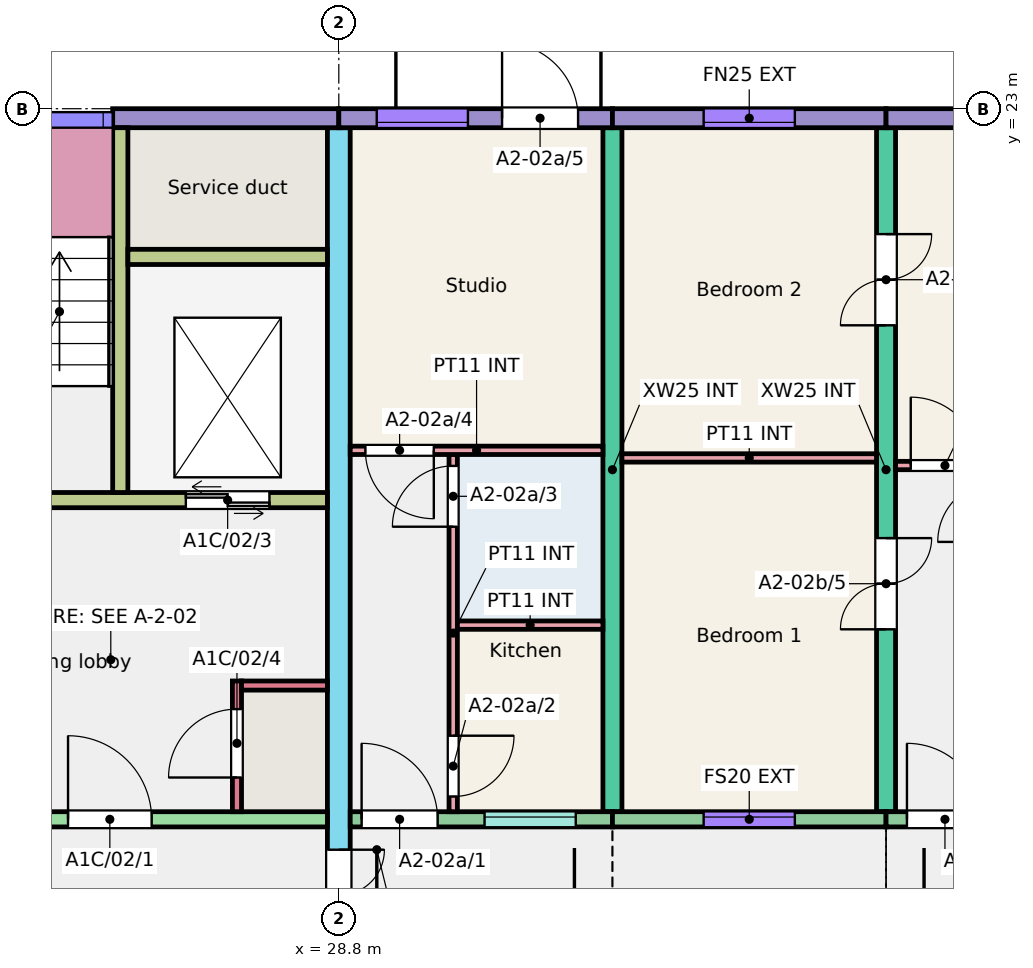
"""IFC4 building model, lengths in metres.
Left out: names, types, materials, properties, quantities, classifications, styles, units other than length and angle.
Written with IfcOpenShell. Run it as: python <this file> out.ifc"""

import sys

from ifc_helpers import new_model, si_unit, direction, frame, frame_2d, origin, place, context, subcontext, project, spatial, rectangle, extrude, element, fill, save


model = new_model("IFC4")
c1 = context("Model", 3, precision=1e-05, world=origin(), true_north=direction((0.0, 1.0)))
c2 = subcontext(c1, "Body", "Model", "MODEL_VIEW")
j1 = project(units=[si_unit("LENGTHUNIT", "METRE"), si_unit("PLANEANGLEUNIT", "RADIAN")], contexts=[c1])
p1 = place(None, origin())
s1 = spatial("IfcSite", under=j1, at=p1, CompositionType="ELEMENT")
p2 = place(p1, origin())
s2 = spatial("IfcBuilding", under=s1, at=p2, CompositionType="ELEMENT")
p3 = place(p2, frame((0.0, 0.0, 6.0)))
s3 = spatial("IfcBuildingStorey", under=s2, at=p3, CompositionType="ELEMENT", Elevation=6.0)
p4 = place(p3, frame((28.8, 11.75, 0.0), z_axis=(0.0, 0.0, 1.0), x_axis=(0.0, 1.0, 0.0)))
e1 = element("IfcWall", 1, at=p4, inside=s3, PredefinedType="SHEAR", context=c2, shape_type="SweptSolid", body=[
    extrude(rectangle(XDim=11.0, YDim=0.3, at=frame_2d((5.5, 0.0))), origin(), (0.0, 0.0, 1.0), 3.0),
])
p5 = place(p4, frame((0.3, 0.0, 0.0)))
e2 = element("IfcOpeningElement", 2, at=p5, cuts=e1, PredefinedType="OPENING", context=c2, shape_type="SweptSolid", body=[
    extrude(rectangle(XDim=1.2, YDim=2.1, at=frame_2d((0.6, 1.05))), frame((0.0, 0.16, 0.0), z_axis=(0.0, -1.0, 0.0), x_axis=(1.0, 0.0, 0.0)), (0.0, 0.0, 1.0), 0.32),
])
p6 = place(p3, frame((32.4, 13.75, 0.0), z_axis=(0.0, 0.0, 1.0), x_axis=(0.0, 1.0, 0.0)))
e3 = element("IfcWall", 3, at=p6, inside=s3, PredefinedType="SHEAR", context=c2, shape_type="SweptSolid", body=[
    extrude(rectangle(XDim=9.0, YDim=0.25, at=frame_2d((4.5, 0.0))), origin(), (0.0, 0.0, 1.0), 3.0),
])
p7 = place(p3, frame((36.0, 13.75, 0.0), z_axis=(0.0, 0.0, 1.0), x_axis=(0.0, 1.0, 0.0)))
e4 = element("IfcWall", 4, at=p7, inside=s3, PredefinedType="SHEAR", context=c2, shape_type="SweptSolid", body=[
    extrude(rectangle(XDim=9.0, YDim=0.25, at=frame_2d((4.5, 0.0))), origin(), (0.0, 0.0, 1.0), 3.0),
])
p8 = place(p7, frame((2.4, 0.0, 0.0)))
e5 = element("IfcOpeningElement", 5, at=p8, cuts=e4, PredefinedType="OPENING", context=c2, shape_type="SweptSolid", body=[
    extrude(rectangle(XDim=1.2, YDim=2.1, at=frame_2d((0.6, 1.05))), frame((0.0, 0.135, 0.0), z_axis=(0.0, -1.0, 0.0), x_axis=(1.0, 0.0, 0.0)), (0.0, 0.0, 1.0), 0.27),
])
p9 = place(p7, frame((6.4, 0.0, 0.0)))
e6 = element("IfcOpeningElement", 6, at=p9, cuts=e4, PredefinedType="OPENING", context=c2, shape_type="SweptSolid", body=[
    extrude(rectangle(XDim=1.2, YDim=2.1, at=frame_2d((0.6, 1.05))), frame((0.0, 0.135, 0.0), z_axis=(0.0, -1.0, 0.0), x_axis=(1.0, 0.0, 0.0)), (0.0, 0.0, 1.0), 0.27),
])
p10 = place(p3, frame((25.825, 22.875, 0.0), z_axis=(0.0, 0.0, 1.0), x_axis=(1.0, 0.0, 0.0)))
e7 = element("IfcWall", 7, at=p10, inside=s3, PredefinedType="SOLIDWALL", context=c2, shape_type="SweptSolid", body=[
    extrude(rectangle(XDim=2.975, YDim=0.25, at=frame_2d((1.488, 0.0))), origin(), (0.0, 0.0, 1.0), 3.0),
])
p11 = place(p3, frame((22.8, 13.65, 0.0), z_axis=(0.0, 0.0, 1.0), x_axis=(1.0, 0.0, 0.0)))
e8 = element("IfcWall", 8, at=p11, inside=s3, PredefinedType="SHEAR", context=c2, shape_type="SweptSolid", body=[
    extrude(rectangle(XDim=5.85, YDim=0.2, at=frame_2d((2.925, 0.0))), origin(), (0.0, 0.0, 1.0), 3.0),
])
p12 = place(p11, frame((2.438, 0.0, 0.0)))
e9 = element("IfcOpeningElement", 9, at=p12, cuts=e8, PredefinedType="OPENING", context=c2, shape_type="SweptSolid", body=[
    extrude(rectangle(XDim=1.1, YDim=2.1, at=frame_2d((0.55, 1.05))), frame((0.0, 0.11, 0.0), z_axis=(0.0, -1.0, 0.0), x_axis=(1.0, 0.0, 0.0)), (0.0, 0.0, 1.0), 0.22),
])
p13 = place(p3, frame((22.925, 17.85, 0.0), z_axis=(0.0, 0.0, 1.0), x_axis=(1.0, 0.0, 0.0)))
e10 = element("IfcWall", 10, at=p13, inside=s3, PredefinedType="SHEAR", context=c2, shape_type="SweptSolid", body=[
    extrude(rectangle(XDim=5.725, YDim=0.2, at=frame_2d((2.862, 0.0))), origin(), (0.0, 0.0, 1.0), 3.0),
])
p14 = place(p13, frame((0.95, 0.0, 0.0)))
e11 = element("IfcOpeningElement", 11, at=p14, cuts=e10, PredefinedType="OPENING", context=c2, shape_type="SweptSolid", body=[
    extrude(rectangle(XDim=1.0, YDim=2.1, at=frame_2d((0.5, 1.05))), frame((0.0, 0.11, 0.0), z_axis=(0.0, -1.0, 0.0), x_axis=(1.0, 0.0, 0.0)), (0.0, 0.0, 1.0), 0.22),
])
p15 = place(p13, frame((3.863, 0.0, 0.0)))
e12 = element("IfcOpeningElement", 12, at=p15, cuts=e10, PredefinedType="OPENING", context=c2, shape_type="SweptSolid", body=[
    extrude(rectangle(XDim=1.1, YDim=2.1, at=frame_2d((0.55, 1.05))), frame((0.0, 0.11, 0.0), z_axis=(0.0, -1.0, 0.0), x_axis=(1.0, 0.0, 0.0)), (0.0, 0.0, 1.0), 0.22),
])
p16 = place(p3, frame((25.925, 17.95, 0.0), z_axis=(0.0, 0.0, 1.0), x_axis=(0.0, 1.0, 0.0)))
e13 = element("IfcWall", 13, at=p16, inside=s3, PredefinedType="SHEAR", context=c2, shape_type="SweptSolid", body=[
    extrude(rectangle(XDim=4.8, YDim=0.2, at=frame_2d((2.4, 0.0))), origin(), (0.0, 0.0, 1.0), 3.0),
])
p17 = place(p3, frame((26.025, 21.05, 0.0), z_axis=(0.0, 0.0, 1.0), x_axis=(1.0, 0.0, 0.0)))
e14 = element("IfcWall", 14, at=p17, inside=s3, PredefinedType="SHEAR", context=c2, shape_type="SweptSolid", body=[
    extrude(rectangle(XDim=2.625, YDim=0.2, at=frame_2d((1.312, 0.0))), origin(), (0.0, 0.0, 1.0), 3.0),
])
p18 = place(p3, frame((27.46, 13.75, 0.0), z_axis=(0.0, 0.0, 1.0), x_axis=(0.0, 1.0, 0.0)))
e15 = element("IfcWall", 15, at=p18, inside=s3, PredefinedType="SHEAR", context=c2, shape_type="SweptSolid", body=[
    extrude(rectangle(XDim=1.72, YDim=0.12, at=frame_2d((0.86, 0.0))), origin(), (0.0, 0.0, 1.0), 3.0),
])
p19 = place(p18, frame((0.45, 0.0, 0.0)))
e16 = element("IfcOpeningElement", 16, at=p19, cuts=e15, PredefinedType="OPENING", context=c2, shape_type="SweptSolid", body=[
    extrude(rectangle(XDim=0.9, YDim=2.1, at=frame_2d((0.45, 1.05))), frame((0.0, 0.07, 0.0), z_axis=(0.0, -1.0, 0.0), x_axis=(1.0, 0.0, 0.0)), (0.0, 0.0, 1.0), 0.14),
])
p20 = place(p3, frame((27.52, 15.41, 0.0), z_axis=(0.0, 0.0, 1.0), x_axis=(1.0, 0.0, 0.0)))
e17 = element("IfcWall", 17, at=p20, inside=s3, PredefinedType="SHEAR", context=c2, shape_type="SweptSolid", body=[
    extrude(rectangle(XDim=1.13, YDim=0.12, at=frame_2d((0.565, 0.0))), origin(), (0.0, 0.0, 1.0), 3.0),
])
p21 = place(p3, frame((28.8, 22.875, 0.0), z_axis=(0.0, 0.0, 1.0), x_axis=(1.0, 0.0, 0.0)))
e18 = element("IfcWall", 18, at=p21, inside=s3, PredefinedType="SOLIDWALL", context=c2, shape_type="SweptSolid", body=[
    extrude(rectangle(XDim=3.6, YDim=0.25, at=frame_2d((1.8, 0.0))), origin(), (0.0, 0.0, 1.0), 3.0),
])
p22 = place(p21, frame((0.499, 0.0, 0.8)))
e19 = element("IfcOpeningElement", 19, at=p22, cuts=e18, PredefinedType="OPENING", context=c2, shape_type="SweptSolid", body=[
    extrude(rectangle(XDim=1.2, YDim=1.6, at=frame_2d((0.6, 0.8))), frame((0.0, 0.135, 0.0), z_axis=(0.0, -1.0, 0.0), x_axis=(1.0, 0.0, 0.0)), (0.0, 0.0, 1.0), 0.27),
])
p23 = place(p21, frame((2.148, 0.0, 0.0)))
e20 = element("IfcOpeningElement", 20, at=p23, cuts=e18, PredefinedType="OPENING", context=c2, shape_type="SweptSolid", body=[
    extrude(rectangle(XDim=1.0, YDim=2.1, at=frame_2d((0.5, 1.05))), frame((0.0, 0.135, 0.0), z_axis=(0.0, -1.0, 0.0), x_axis=(1.0, 0.0, 0.0)), (0.0, 0.0, 1.0), 0.27),
])
p24 = place(p3, frame((28.95, 13.65, 0.0), z_axis=(0.0, 0.0, 1.0), x_axis=(1.0, 0.0, 0.0)))
e21 = element("IfcWall", 21, at=p24, inside=s3, PredefinedType="SOLIDWALL", context=c2, shape_type="SweptSolid", body=[
    extrude(rectangle(XDim=3.45, YDim=0.2, at=frame_2d((1.725, 0.0))), origin(), (0.0, 0.0, 1.0), 3.0),
])
p25 = place(p24, frame((1.768, 0.0, 1.1)))
e22 = element("IfcOpeningElement", 22, at=p25, cuts=e21, PredefinedType="OPENING", context=c2, shape_type="SweptSolid", body=[
    extrude(rectangle(XDim=1.2, YDim=1.3, at=frame_2d((0.6, 0.65))), frame((0.0, 0.11, 0.0), z_axis=(0.0, -1.0, 0.0), x_axis=(1.0, 0.0, 0.0)), (0.0, 0.0, 1.0), 0.22),
])
p26 = place(p24, frame((0.15, 0.0, 0.0)))
e23 = element("IfcOpeningElement", 23, at=p26, cuts=e21, PredefinedType="OPENING", context=c2, shape_type="SweptSolid", body=[
    extrude(rectangle(XDim=1.0, YDim=2.1, at=frame_2d((0.5, 1.05))), frame((0.0, 0.11, 0.0), z_axis=(0.0, -1.0, 0.0), x_axis=(1.0, 0.0, 0.0)), (0.0, 0.0, 1.0), 0.22),
])
p27 = place(p3, frame((32.4, 22.875, 0.0), z_axis=(0.0, 0.0, 1.0), x_axis=(1.0, 0.0, 0.0)))
e24 = element("IfcWall", 24, at=p27, inside=s3, PredefinedType="SOLIDWALL", context=c2, shape_type="SweptSolid", body=[
    extrude(rectangle(XDim=3.6, YDim=0.25, at=frame_2d((1.8, 0.0))), origin(), (0.0, 0.0, 1.0), 3.0),
])
p28 = place(p27, frame((1.2, 0.0, 0.8)))
e25 = element("IfcOpeningElement", 25, at=p28, cuts=e24, PredefinedType="OPENING", context=c2, shape_type="SweptSolid", body=[
    extrude(rectangle(XDim=1.2, YDim=1.6, at=frame_2d((0.6, 0.8))), frame((0.0, 0.135, 0.0), z_axis=(0.0, -1.0, 0.0), x_axis=(1.0, 0.0, 0.0)), (0.0, 0.0, 1.0), 0.27),
])
p29 = place(p3, frame((32.4, 13.65, 0.0), z_axis=(0.0, 0.0, 1.0), x_axis=(1.0, 0.0, 0.0)))
e26 = element("IfcWall", 26, at=p29, inside=s3, PredefinedType="SOLIDWALL", context=c2, shape_type="SweptSolid", body=[
    extrude(rectangle(XDim=3.6, YDim=0.2, at=frame_2d((1.8, 0.0))), origin(), (0.0, 0.0, 1.0), 3.0),
])
p30 = place(p29, frame((1.2, 0.0, 0.8)))
e27 = element("IfcOpeningElement", 27, at=p30, cuts=e26, PredefinedType="OPENING", context=c2, shape_type="SweptSolid", body=[
    extrude(rectangle(XDim=1.2, YDim=1.6, at=frame_2d((0.6, 0.8))), frame((0.0, 0.11, 0.0), z_axis=(0.0, -1.0, 0.0), x_axis=(1.0, 0.0, 0.0)), (0.0, 0.0, 1.0), 0.22),
])
p31 = place(p3, frame((36.0, 22.875, 0.0), z_axis=(0.0, 0.0, 1.0), x_axis=(1.0, 0.0, 0.0)))
e28 = element("IfcWall", 28, at=p31, inside=s3, PredefinedType="SOLIDWALL", context=c2, shape_type="SweptSolid", body=[
    extrude(rectangle(XDim=3.6, YDim=0.25, at=frame_2d((1.8, 0.0))), origin(), (0.0, 0.0, 1.0), 3.0),
])
p32 = place(p31, frame((1.2, 0.0, 0.8)))
e29 = element("IfcOpeningElement", 29, at=p32, cuts=e28, PredefinedType="OPENING", context=c2, shape_type="SweptSolid", body=[
    extrude(rectangle(XDim=1.2, YDim=1.6, at=frame_2d((0.6, 0.8))), frame((0.0, 0.135, 0.0), z_axis=(0.0, -1.0, 0.0), x_axis=(1.0, 0.0, 0.0)), (0.0, 0.0, 1.0), 0.27),
])
p33 = place(p3, frame((36.0, 13.65, 0.0), z_axis=(0.0, 0.0, 1.0), x_axis=(1.0, 0.0, 0.0)))
e30 = element("IfcWall", 30, at=p33, inside=s3, PredefinedType="SOLIDWALL", context=c2, shape_type="SweptSolid", body=[
    extrude(rectangle(XDim=3.6, YDim=0.2, at=frame_2d((1.8, 0.0))), origin(), (0.0, 0.0, 1.0), 3.0),
])
p34 = place(p33, frame((1.905, 0.0, 1.1)))
e31 = element("IfcOpeningElement", 31, at=p34, cuts=e30, PredefinedType="OPENING", context=c2, shape_type="SweptSolid", body=[
    extrude(rectangle(XDim=1.2, YDim=1.3, at=frame_2d((0.6, 0.65))), frame((0.0, 0.11, 0.0), z_axis=(0.0, -1.0, 0.0), x_axis=(1.0, 0.0, 0.0)), (0.0, 0.0, 1.0), 0.22),
])
p35 = place(p33, frame((0.275, 0.0, 0.0)))
e32 = element("IfcOpeningElement", 32, at=p35, cuts=e30, PredefinedType="OPENING", context=c2, shape_type="SweptSolid", body=[
    extrude(rectangle(XDim=1.0, YDim=2.1, at=frame_2d((0.5, 1.05))), frame((0.0, 0.11, 0.0), z_axis=(0.0, -1.0, 0.0), x_axis=(1.0, 0.0, 0.0)), (0.0, 0.0, 1.0), 0.22),
])
p36 = place(p3, frame((30.305, 13.75, 0.0), z_axis=(0.0, 0.0, 1.0), x_axis=(0.0, 1.0, 0.0)))
e33 = element("IfcWall", 33, at=p36, inside=s3, PredefinedType="PARTITIONING", context=c2, shape_type="SweptSolid", body=[
    extrude(rectangle(XDim=4.7, YDim=0.11, at=frame_2d((2.35, 0.0))), origin(), (0.0, 0.0, 1.0), 2.8),
])
p37 = place(p36, frame((0.2, 0.0, 0.0)))
e34 = element("IfcOpeningElement", 34, at=p37, cuts=e33, PredefinedType="OPENING", context=c2, shape_type="SweptSolid", body=[
    extrude(rectangle(XDim=0.8, YDim=2.1, at=frame_2d((0.4, 1.05))), frame((0.0, 0.065, 0.0), z_axis=(0.0, -1.0, 0.0), x_axis=(1.0, 0.0, 0.0)), (0.0, 0.0, 1.0), 0.13),
])
p38 = place(p36, frame((3.75, 0.0, 0.0)))
e35 = element("IfcOpeningElement", 35, at=p38, cuts=e33, PredefinedType="OPENING", context=c2, shape_type="SweptSolid", body=[
    extrude(rectangle(XDim=0.8, YDim=2.1, at=frame_2d((0.4, 1.05))), frame((0.0, 0.065, 0.0), z_axis=(0.0, -1.0, 0.0), x_axis=(1.0, 0.0, 0.0)), (0.0, 0.0, 1.0), 0.13),
])
p39 = place(p3, frame((30.36, 16.205, 0.0), z_axis=(0.0, 0.0, 1.0), x_axis=(1.0, 0.0, 0.0)))
e36 = element("IfcWall", 36, at=p39, inside=s3, PredefinedType="PARTITIONING", context=c2, shape_type="SweptSolid", body=[
    extrude(rectangle(XDim=1.915, YDim=0.11, at=frame_2d((0.958, 0.0))), origin(), (0.0, 0.0, 1.0), 2.8),
])
p40 = place(p3, frame((28.95, 18.505, 0.0), z_axis=(0.0, 0.0, 1.0), x_axis=(1.0, 0.0, 0.0)))
e37 = element("IfcWall", 37, at=p40, inside=s3, PredefinedType="PARTITIONING", context=c2, shape_type="SweptSolid", body=[
    extrude(rectangle(XDim=3.325, YDim=0.11, at=frame_2d((1.663, 0.0))), origin(), (0.0, 0.0, 1.0), 2.8),
])
p41 = place(p40, frame((0.2, 0.0, 0.0)))
e38 = element("IfcOpeningElement", 38, at=p41, cuts=e37, PredefinedType="OPENING", context=c2, shape_type="SweptSolid", body=[
    extrude(rectangle(XDim=0.9, YDim=2.1, at=frame_2d((0.45, 1.05))), frame((0.0, 0.065, 0.0), z_axis=(0.0, -1.0, 0.0), x_axis=(1.0, 0.0, 0.0)), (0.0, 0.0, 1.0), 0.13),
])
p42 = place(p3, frame((36.125, 18.305, 0.0), z_axis=(0.0, 0.0, 1.0), x_axis=(1.0, 0.0, 0.0)))
e39 = element("IfcWall", 39, at=p42, inside=s3, PredefinedType="PARTITIONING", context=c2, shape_type="SweptSolid", body=[
    extrude(rectangle(XDim=3.35, YDim=0.11, at=frame_2d((1.675, 0.0))), origin(), (0.0, 0.0, 1.0), 2.8),
])
p43 = place(p42, frame((0.2, 0.0, 0.0)))
e40 = element("IfcOpeningElement", 40, at=p43, cuts=e39, PredefinedType="OPENING", context=c2, shape_type="SweptSolid", body=[
    extrude(rectangle(XDim=0.9, YDim=2.1, at=frame_2d((0.45, 1.05))), frame((0.0, 0.065, 0.0), z_axis=(0.0, -1.0, 0.0), x_axis=(1.0, 0.0, 0.0)), (0.0, 0.0, 1.0), 0.13),
])
p44 = place(p3, frame((32.525, 18.405, 0.0), z_axis=(0.0, 0.0, 1.0), x_axis=(1.0, 0.0, 0.0)))
e41 = element("IfcWall", 41, at=p44, inside=s3, PredefinedType="PARTITIONING", context=c2, shape_type="SweptSolid", body=[
    extrude(rectangle(XDim=3.35, YDim=0.11, at=frame_2d((1.675, 0.0))), origin(), (0.0, 0.0, 1.0), 2.8),
])
p45 = place(p25, origin())
e42 = element("IfcWindow", 42, at=p45, inside=s3, PartitioningType="SINGLE_PANEL", PredefinedType="WINDOW", context=c2, shape_type="SweptSolid", body=[
    extrude(rectangle(XDim=1.2, YDim=1.3, at=frame_2d((0.6, 0.65))), frame((0.0, 0.06, 0.0), z_axis=(0.0, -1.0, 0.0), x_axis=(1.0, 0.0, 0.0)), (0.0, 0.0, 1.0), 0.06),
])
fill(e22, e42)
p46 = place(p22, origin())
e43 = element("IfcWindow", 43, at=p46, inside=s3, PartitioningType="SINGLE_PANEL", PredefinedType="WINDOW", context=c2, shape_type="SweptSolid", body=[
    extrude(rectangle(XDim=1.2, YDim=1.6, at=frame_2d((0.6, 0.8))), frame((0.0, -0.025, 0.0), z_axis=(0.0, -1.0, 0.0), x_axis=(1.0, 0.0, 0.0)), (0.0, 0.0, 1.0), 0.06),
])
fill(e19, e43)
p47 = place(p30, origin())
e44 = element("IfcWindow", 44, at=p47, inside=s3, PartitioningType="SINGLE_PANEL", PredefinedType="WINDOW", context=c2, shape_type="SweptSolid", body=[
    extrude(rectangle(XDim=1.2, YDim=1.6, at=frame_2d((0.6, 0.8))), frame((0.0, 0.06, 0.0), z_axis=(0.0, -1.0, 0.0), x_axis=(1.0, 0.0, 0.0)), (0.0, 0.0, 1.0), 0.06),
])
fill(e27, e44)
p48 = place(p28, origin())
e45 = element("IfcWindow", 45, at=p48, inside=s3, PartitioningType="SINGLE_PANEL", PredefinedType="WINDOW", context=c2, shape_type="SweptSolid", body=[
    extrude(rectangle(XDim=1.2, YDim=1.6, at=frame_2d((0.6, 0.8))), frame((0.0, -0.025, 0.0), z_axis=(0.0, -1.0, 0.0), x_axis=(1.0, 0.0, 0.0)), (0.0, 0.0, 1.0), 0.06),
])
fill(e25, e45)
p49 = place(p26, origin())
e46 = element("IfcDoor", 46, at=p49, inside=s3, OperationType="SINGLE_SWING_LEFT", PredefinedType="DOOR", context=c2, shape_type="SweptSolid", body=[
    extrude(rectangle(XDim=1.0, YDim=2.1, at=frame_2d((0.5, 1.05))), frame((0.0, 0.025, 0.0), z_axis=(0.0, -1.0, 0.0), x_axis=(1.0, 0.0, 0.0)), (0.0, 0.0, 1.0), 0.05),
])
fill(e23, e46)
p50 = place(p37, origin())
e47 = element("IfcDoor", 47, at=p50, inside=s3, OperationType="SINGLE_SWING_RIGHT", PredefinedType="DOOR", context=c2, shape_type="SweptSolid", body=[
    extrude(rectangle(XDim=0.8, YDim=2.1, at=frame_2d((0.4, 1.05))), frame((0.0, 0.025, 0.0), z_axis=(0.0, -1.0, 0.0), x_axis=(1.0, 0.0, 0.0)), (0.0, 0.0, 1.0), 0.05),
])
fill(e34, e47)
p51 = place(p38, origin())
e48 = element("IfcDoor", 48, at=p51, inside=s3, OperationType="SINGLE_SWING_LEFT", PredefinedType="DOOR", context=c2, shape_type="SweptSolid", body=[
    extrude(rectangle(XDim=0.8, YDim=2.1, at=frame_2d((0.4, 1.05))), frame((0.0, 0.025, 0.0), z_axis=(0.0, -1.0, 0.0), x_axis=(1.0, 0.0, 0.0)), (0.0, 0.0, 1.0), 0.05),
])
fill(e35, e48)
p52 = place(p41, origin())
e49 = element("IfcDoor", 49, at=p52, inside=s3, OperationType="SINGLE_SWING_RIGHT", PredefinedType="DOOR", context=c2, shape_type="SweptSolid", body=[
    extrude(rectangle(XDim=0.9, YDim=2.1, at=frame_2d((0.45, 1.05))), frame((0.0, 0.025, 0.0), z_axis=(0.0, -1.0, 0.0), x_axis=(1.0, 0.0, 0.0)), (0.0, 0.0, 1.0), 0.05),
])
fill(e38, e49)
p53 = place(p23, origin())
e50 = element("IfcDoor", 50, at=p53, inside=s3, OperationType="SINGLE_SWING_LEFT", PredefinedType="DOOR", context=c2, shape_type="SweptSolid", body=[
    extrude(rectangle(XDim=1.0, YDim=2.1, at=frame_2d((0.5, 1.05))), frame((0.0, 0.025, 0.0), z_axis=(0.0, -1.0, 0.0), x_axis=(1.0, 0.0, 0.0)), (0.0, 0.0, 1.0), 0.05),
])
fill(e20, e50)
p54 = place(p35, origin())
e51 = element("IfcDoor", 51, at=p54, inside=s3, OperationType="SINGLE_SWING_LEFT", PredefinedType="DOOR", context=c2, shape_type="SweptSolid", body=[
    extrude(rectangle(XDim=1.0, YDim=2.1, at=frame_2d((0.5, 1.05))), frame((0.0, 0.025, 0.0), z_axis=(0.0, -1.0, 0.0), x_axis=(1.0, 0.0, 0.0)), (0.0, 0.0, 1.0), 0.05),
])
fill(e32, e51)
p55 = place(p43, origin())
e52 = element("IfcDoor", 52, at=p55, inside=s3, OperationType="SINGLE_SWING_LEFT", PredefinedType="DOOR", context=c2, shape_type="SweptSolid", body=[
    extrude(rectangle(XDim=0.9, YDim=2.1, at=frame_2d((0.45, 1.05))), frame((0.0, 0.025, 0.0), z_axis=(0.0, -1.0, 0.0), x_axis=(1.0, 0.0, 0.0)), (0.0, 0.0, 1.0), 0.05),
])
fill(e40, e52)
p56 = place(p8, origin())
e53 = element("IfcDoor", 53, at=p56, inside=s3, OperationType="DOUBLE_DOOR_SINGLE_SWING", PredefinedType="DOOR", context=c2, shape_type="SweptSolid", body=[
    extrude(rectangle(XDim=1.2, YDim=2.1, at=frame_2d((0.6, 1.05))), frame((0.0, 0.025, 0.0), z_axis=(0.0, -1.0, 0.0), x_axis=(1.0, 0.0, 0.0)), (0.0, 0.0, 1.0), 0.05),
])
fill(e5, e53)
p57 = place(p9, origin())
e54 = element("IfcDoor", 54, at=p57, inside=s3, OperationType="DOUBLE_DOOR_SINGLE_SWING", PredefinedType="DOOR", context=c2, shape_type="SweptSolid", body=[
    extrude(rectangle(XDim=1.2, YDim=2.1, at=frame_2d((0.6, 1.05))), frame((0.0, 0.025, 0.0), z_axis=(0.0, -1.0, 0.0), x_axis=(1.0, 0.0, 0.0)), (0.0, 0.0, 1.0), 0.05),
])
fill(e6, e54)
p58 = place(p12, origin())
e55 = element("IfcDoor", 55, at=p58, inside=s3, OperationType="SINGLE_SWING_LEFT", PredefinedType="DOOR", context=c2, shape_type="SweptSolid", body=[
    extrude(rectangle(XDim=1.1, YDim=2.1, at=frame_2d((0.55, 1.05))), frame((0.0, 0.025, 0.0), z_axis=(0.0, -1.0, 0.0), x_axis=(1.0, 0.0, 0.0)), (0.0, 0.0, 1.0), 0.05),
])
fill(e9, e55)
p59 = place(p15, origin())
e56 = element("IfcDoor", 56, at=p59, inside=s3, OperationType="DOUBLE_DOOR_SLIDING", PredefinedType="DOOR", context=c2, shape_type="SweptSolid", body=[
    extrude(rectangle(XDim=1.1, YDim=2.1, at=frame_2d((0.55, 1.05))), frame((0.0, 0.025, 0.0), z_axis=(0.0, -1.0, 0.0), x_axis=(1.0, 0.0, 0.0)), (0.0, 0.0, 1.0), 0.05),
])
fill(e12, e56)
p60 = place(p19, origin())
e57 = element("IfcDoor", 57, at=p60, inside=s3, OperationType="SINGLE_SWING_LEFT", PredefinedType="DOOR", context=c2, shape_type="SweptSolid", body=[
    extrude(rectangle(XDim=0.9, YDim=2.1, at=frame_2d((0.45, 1.05))), frame((0.0, 0.025, 0.0), z_axis=(0.0, -1.0, 0.0), x_axis=(1.0, 0.0, 0.0)), (0.0, 0.0, 1.0), 0.05),
])
fill(e16, e57)
p61 = place(p5, origin())
e58 = element("IfcDoor", 58, at=p61, inside=s3, OperationType="DOUBLE_DOOR_SINGLE_SWING", PredefinedType="DOOR", context=c2, shape_type="SweptSolid", body=[
    extrude(rectangle(XDim=1.2, YDim=2.1, at=frame_2d((0.6, 1.05))), frame((0.0, 0.025, 0.0), z_axis=(0.0, -1.0, 0.0), x_axis=(1.0, 0.0, 0.0)), (0.0, 0.0, 1.0), 0.05),
])
fill(e2, e58)
save(model, sys.argv[1])
